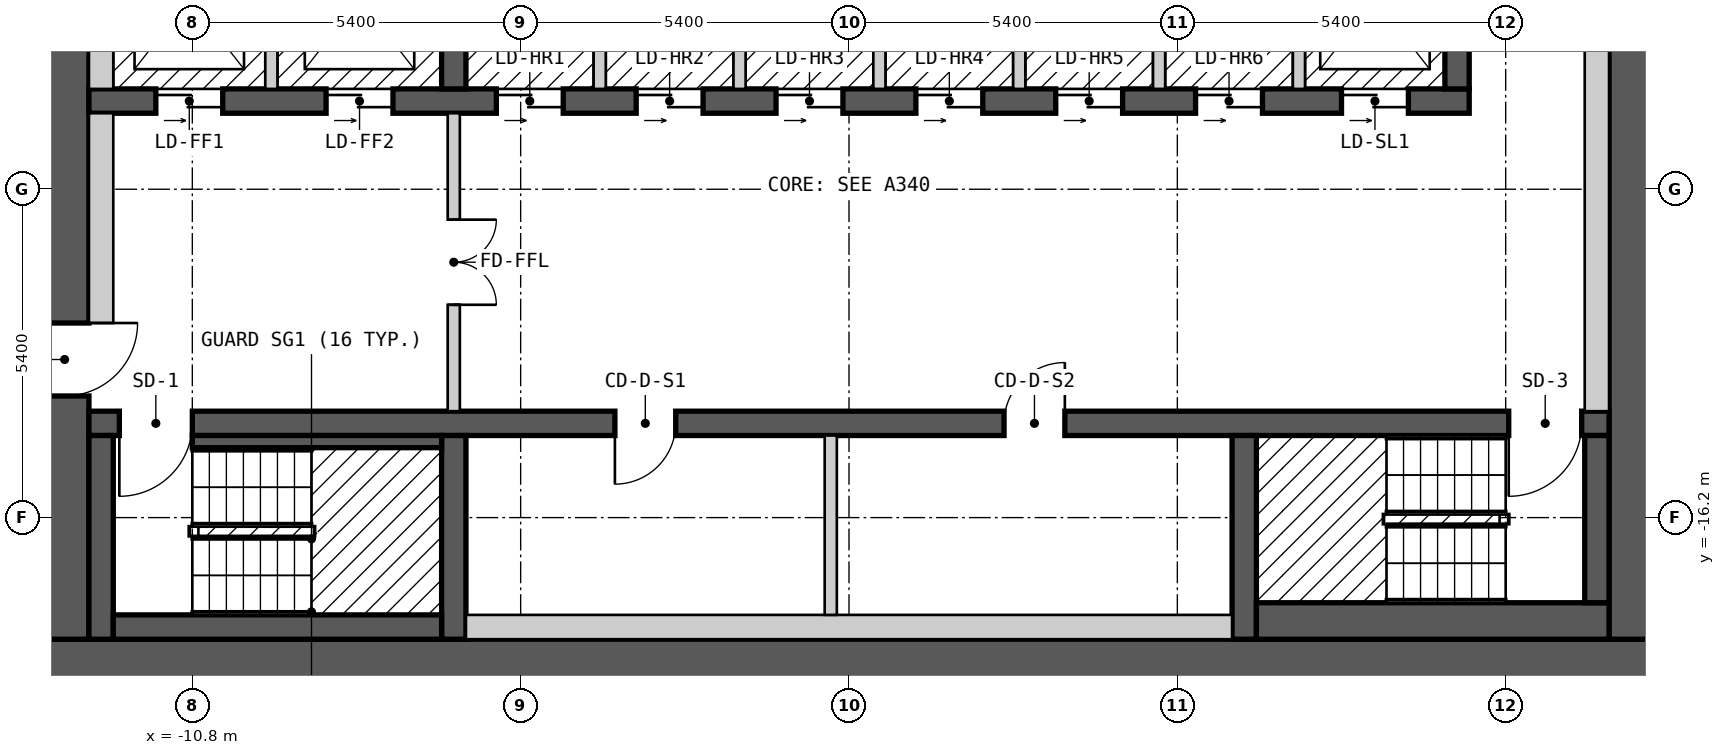
"""IFC4 building model, lengths in metres.
Left out: names, types, materials, properties, quantities, classifications, styles, units other than length and angle.
Written with IfcOpenShell. Run it as: python <this file> out.ifc"""

import sys

from ifc_helpers import new_model, si_unit, direction, frame, frame_2d, origin, place, context, subcontext, project, spatial, rectangle, extrude, element, fill, save


model = new_model("IFC4")
c1 = context("Model", 3, precision=1e-05, world=origin(), true_north=direction((0.0, 1.0)))
c2 = subcontext(c1, "Body", "Model", "MODEL_VIEW")
j1 = project(units=[si_unit("LENGTHUNIT", "METRE"), si_unit("PLANEANGLEUNIT", "RADIAN")], contexts=[c1])
p1 = place(None, origin())
s1 = spatial("IfcSite", under=j1, at=p1, CompositionType="ELEMENT")
p2 = place(p1, origin())
s2 = spatial("IfcBuilding", under=s1, at=p2, CompositionType="ELEMENT")
p3 = place(p2, frame((0.0, 0.0, 147.6)))
s3 = spatial("IfcBuildingStorey", under=s2, at=p3, CompositionType="ELEMENT", Elevation=147.6)
p4 = place(p3, frame((-13.3, -18.6, 0.0), z_axis=(0.0, 0.0, 1.0), x_axis=(1.0, 0.0, 0.0)))
e1 = element("IfcWall", 1, at=p4, inside=s3, PredefinedType="SHEAR", context=c2, shape_type="SweptSolid", body=[
    extrude(rectangle(XDim=26.6, YDim=0.8, at=frame_2d((13.3, 0.0))), origin(), (0.0, 0.0, 1.0), 2.7),
])
p5 = place(p3, frame((-12.9, -18.2, 0.0), z_axis=(0.0, 0.0, 1.0), x_axis=(0.0, 1.0, 0.0)))
e2 = element("IfcWall", 2, at=p5, inside=s3, PredefinedType="SHEAR", context=c2, shape_type="SweptSolid", body=[
    extrude(rectangle(XDim=12.4, YDim=0.8, at=frame_2d((6.2, 0.0))), origin(), (0.0, 0.0, 1.0), 2.7),
])
p6 = place(p5, frame((4.0, 0.0, 0.0)))
e3 = element("IfcOpeningElement", 3, at=p6, cuts=e2, PredefinedType="OPENING", context=c2, shape_type="SweptSolid", body=[
    extrude(rectangle(XDim=1.2, YDim=2.1, at=frame_2d((0.6, 1.05))), frame((0.0, 0.41, 0.0), z_axis=(0.0, -1.0, 0.0), x_axis=(1.0, 0.0, 0.0)), (0.0, 0.0, 1.0), 0.82),
])
p7 = place(p3, frame((12.9, -18.2, 0.0), z_axis=(0.0, 0.0, 1.0), x_axis=(0.0, 1.0, 0.0)))
e4 = element("IfcWall", 4, at=p7, inside=s3, PredefinedType="SHEAR", context=c2, shape_type="SweptSolid", body=[
    extrude(rectangle(XDim=12.4, YDim=0.8, at=frame_2d((6.2, 0.0))), origin(), (0.0, 0.0, 1.0), 2.7),
])
p8 = place(p3, frame((-12.5, -14.65, 0.0), z_axis=(0.0, 0.0, 1.0), x_axis=(1.0, 0.0, 0.0)))
e5 = element("IfcWall", 5, at=p8, inside=s3, PredefinedType="SHEAR", context=c2, shape_type="SweptSolid", body=[
    extrude(rectangle(XDim=25.0, YDim=0.4, at=frame_2d((12.5, 0.0))), origin(), (0.0, 0.0, 1.0), 2.7),
])
p9 = place(p8, frame((1.7, 0.0, 0.0), z_axis=(0.0, 0.0, 1.0), x_axis=(-1.0, 0.0, 0.0)))
e6 = element("IfcOpeningElement", 6, at=p9, cuts=e5, PredefinedType="OPENING", context=c2, shape_type="SweptSolid", body=[
    extrude(rectangle(XDim=1.2, YDim=2.1, at=frame_2d((0.6, 1.05))), frame((0.0, 0.21, 0.0), z_axis=(0.0, -1.0, 0.0), x_axis=(1.0, 0.0, 0.0)), (0.0, 0.0, 1.0), 0.42),
])
p10 = place(p8, frame((24.55, 0.0, 0.0), z_axis=(0.0, 0.0, 1.0), x_axis=(-1.0, 0.0, 0.0)))
e7 = element("IfcOpeningElement", 7, at=p10, cuts=e5, PredefinedType="OPENING", context=c2, shape_type="SweptSolid", body=[
    extrude(rectangle(XDim=1.2, YDim=2.1, at=frame_2d((0.6, 1.05))), frame((0.0, 0.21, 0.0), z_axis=(0.0, -1.0, 0.0), x_axis=(1.0, 0.0, 0.0)), (0.0, 0.0, 1.0), 0.42),
])
p11 = place(p8, frame((9.65, 0.0, 0.0), z_axis=(0.0, 0.0, 1.0), x_axis=(-1.0, 0.0, 0.0)))
e8 = element("IfcOpeningElement", 8, at=p11, cuts=e5, PredefinedType="OPENING", context=c2, shape_type="SweptSolid", body=[
    extrude(rectangle(XDim=1.0, YDim=2.1, at=frame_2d((0.5, 1.05))), frame((0.0, 0.21, 0.0), z_axis=(0.0, -1.0, 0.0), x_axis=(1.0, 0.0, 0.0)), (0.0, 0.0, 1.0), 0.42),
])
p12 = place(p8, frame((16.05, 0.0, 0.0), z_axis=(0.0, 0.0, 1.0), x_axis=(-1.0, 0.0, 0.0)))
e9 = element("IfcOpeningElement", 9, at=p12, cuts=e5, PredefinedType="OPENING", context=c2, shape_type="SweptSolid", body=[
    extrude(rectangle(XDim=1.0, YDim=2.1, at=frame_2d((0.5, 1.05))), frame((0.0, 0.21, 0.0), z_axis=(0.0, -1.0, 0.0), x_axis=(1.0, 0.0, 0.0)), (0.0, 0.0, 1.0), 0.42),
])
p13 = place(p3, frame((-12.5, -9.35, 0.0), z_axis=(0.0, 0.0, 1.0), x_axis=(1.0, 0.0, 0.0)))
e10 = element("IfcWall", 10, at=p13, inside=s3, PredefinedType="SHEAR", context=c2, shape_type="SweptSolid", body=[
    extrude(rectangle(XDim=22.7, YDim=0.4, at=frame_2d((11.35, 0.0))), origin(), (0.0, 0.0, 1.0), 2.7),
])
p14 = place(p13, frame((1.1, 0.0, 0.0)))
e11 = element("IfcOpeningElement", 11, at=p14, cuts=e10, PredefinedType="OPENING", context=c2, shape_type="SweptSolid", body=[
    extrude(rectangle(XDim=1.1, YDim=2.1, at=frame_2d((0.55, 1.05))), frame((0.0, 0.21, 0.0), z_axis=(0.0, -1.0, 0.0), x_axis=(1.0, 0.0, 0.0)), (0.0, 0.0, 1.0), 0.42),
])
p15 = place(p13, frame((3.9, 0.0, 0.0)))
e12 = element("IfcOpeningElement", 12, at=p15, cuts=e10, PredefinedType="OPENING", context=c2, shape_type="SweptSolid", body=[
    extrude(rectangle(XDim=1.1, YDim=2.1, at=frame_2d((0.55, 1.05))), frame((0.0, 0.21, 0.0), z_axis=(0.0, -1.0, 0.0), x_axis=(1.0, 0.0, 0.0)), (0.0, 0.0, 1.0), 0.42),
])
p16 = place(p13, frame((6.7, 0.0, 0.0)))
e13 = element("IfcOpeningElement", 13, at=p16, cuts=e10, PredefinedType="OPENING", context=c2, shape_type="SweptSolid", body=[
    extrude(rectangle(XDim=1.1, YDim=2.1, at=frame_2d((0.55, 1.05))), frame((0.0, 0.21, 0.0), z_axis=(0.0, -1.0, 0.0), x_axis=(1.0, 0.0, 0.0)), (0.0, 0.0, 1.0), 0.42),
])
p17 = place(p13, frame((9.0, 0.0, 0.0)))
e14 = element("IfcOpeningElement", 14, at=p17, cuts=e10, PredefinedType="OPENING", context=c2, shape_type="SweptSolid", body=[
    extrude(rectangle(XDim=1.1, YDim=2.1, at=frame_2d((0.55, 1.05))), frame((0.0, 0.21, 0.0), z_axis=(0.0, -1.0, 0.0), x_axis=(1.0, 0.0, 0.0)), (0.0, 0.0, 1.0), 0.42),
])
p18 = place(p13, frame((11.3, 0.0, 0.0)))
e15 = element("IfcOpeningElement", 15, at=p18, cuts=e10, PredefinedType="OPENING", context=c2, shape_type="SweptSolid", body=[
    extrude(rectangle(XDim=1.1, YDim=2.1, at=frame_2d((0.55, 1.05))), frame((0.0, 0.21, 0.0), z_axis=(0.0, -1.0, 0.0), x_axis=(1.0, 0.0, 0.0)), (0.0, 0.0, 1.0), 0.42),
])
p19 = place(p13, frame((13.6, 0.0, 0.0)))
e16 = element("IfcOpeningElement", 16, at=p19, cuts=e10, PredefinedType="OPENING", context=c2, shape_type="SweptSolid", body=[
    extrude(rectangle(XDim=1.1, YDim=2.1, at=frame_2d((0.55, 1.05))), frame((0.0, 0.21, 0.0), z_axis=(0.0, -1.0, 0.0), x_axis=(1.0, 0.0, 0.0)), (0.0, 0.0, 1.0), 0.42),
])
p20 = place(p13, frame((15.9, 0.0, 0.0)))
e17 = element("IfcOpeningElement", 17, at=p20, cuts=e10, PredefinedType="OPENING", context=c2, shape_type="SweptSolid", body=[
    extrude(rectangle(XDim=1.1, YDim=2.1, at=frame_2d((0.55, 1.05))), frame((0.0, 0.21, 0.0), z_axis=(0.0, -1.0, 0.0), x_axis=(1.0, 0.0, 0.0)), (0.0, 0.0, 1.0), 0.42),
])
p21 = place(p13, frame((18.2, 0.0, 0.0)))
e18 = element("IfcOpeningElement", 18, at=p21, cuts=e10, PredefinedType="OPENING", context=c2, shape_type="SweptSolid", body=[
    extrude(rectangle(XDim=1.1, YDim=2.1, at=frame_2d((0.55, 1.05))), frame((0.0, 0.21, 0.0), z_axis=(0.0, -1.0, 0.0), x_axis=(1.0, 0.0, 0.0)), (0.0, 0.0, 1.0), 0.42),
])
p22 = place(p13, frame((20.6, 0.0, 0.0)))
e19 = element("IfcOpeningElement", 19, at=p22, cuts=e10, PredefinedType="OPENING", context=c2, shape_type="SweptSolid", body=[
    extrude(rectangle(XDim=1.1, YDim=2.1, at=frame_2d((0.55, 1.05))), frame((0.0, 0.21, 0.0), z_axis=(0.0, -1.0, 0.0), x_axis=(1.0, 0.0, 0.0)), (0.0, 0.0, 1.0), 0.42),
])
for number, where, z_axis, x_axis in (
    (20, (-6.5, -18.2, 0.0), (0.0, 0.0, 1.0), (0.0, 1.0, 0.0)),
    (21, (6.5, -18.2, 0.0), (0.0, 0.0, 1.0), (0.0, 1.0, 0.0)),
    (22, (-6.5, -9.15, 0.0), (0.0, 0.0, 1.0), (0.0, 1.0, 0.0)),
    (23, (10.0, -9.15, 0.0), (0.0, 0.0, 1.0), (0.0, 1.0, 0.0)),
):
    element("IfcWall", number, at=place(p3, frame(where, z_axis=z_axis, x_axis=x_axis)), inside=s3, PredefinedType="SHEAR", context=c2, shape_type="SweptSolid", body=[
        extrude(rectangle(XDim=3.35, YDim=0.4, at=frame_2d((1.675, 0.0))), origin(), (0.0, 0.0, 1.0), 2.7),
    ])
p23 = place(p3, frame((-12.3, -18.2, 0.0), z_axis=(0.0, 0.0, 1.0), x_axis=(0.0, 1.0, 0.0)))
e24 = element("IfcWall", 24, at=p23, inside=s3, PredefinedType="SOLIDWALL", context=c2, shape_type="SweptSolid", body=[
    extrude(rectangle(XDim=3.35, YDim=0.4, at=frame_2d((1.675, 0.0))), origin(), (0.0, 0.0, 1.0), 2.7),
])
p24 = place(p3, frame((-12.3, -13.0, 0.0), z_axis=(0.0, 0.0, 1.0), x_axis=(0.0, 1.0, 0.0)))
e25 = element("IfcWall", 25, at=p24, inside=s3, PredefinedType="PARTITIONING", context=c2, shape_type="SweptSolid", body=[
    extrude(rectangle(XDim=3.45, YDim=0.4, at=frame_2d((1.725, 0.0))), origin(), (0.0, 0.0, 1.0), 2.7),
])
p25 = place(p3, frame((-12.3, -9.15, 0.0), z_axis=(0.0, 0.0, 1.0), x_axis=(0.0, 1.0, 0.0)))
e26 = element("IfcWall", 26, at=p25, inside=s3, PredefinedType="SOLIDWALL", context=c2, shape_type="SweptSolid", body=[
    extrude(rectangle(XDim=3.35, YDim=0.4, at=frame_2d((1.675, 0.0))), origin(), (0.0, 0.0, 1.0), 2.7),
])
p26 = place(p3, frame((-12.1, -18.0, 0.0), z_axis=(0.0, 0.0, 1.0), x_axis=(1.0, 0.0, 0.0)))
e27 = element("IfcWall", 27, at=p26, inside=s3, PredefinedType="SOLIDWALL", context=c2, shape_type="SweptSolid", body=[
    extrude(rectangle(XDim=5.4, YDim=0.4, at=frame_2d((2.7, 0.0))), origin(), (0.0, 0.0, 1.0), 2.7),
])
p27 = place(p3, frame((-10.8, -14.95, 0.0), z_axis=(0.0, 0.0, 1.0), x_axis=(1.0, 0.0, 0.0)))
e28 = element("IfcWall", 28, at=p27, inside=s3, PredefinedType="SOLIDWALL", context=c2, shape_type="SweptSolid", body=[
    extrude(rectangle(XDim=4.1, YDim=0.2, at=frame_2d((2.05, 0.0))), origin(), (0.0, 0.0, 1.0), 2.7),
])
p28 = place(p3, frame((-9.5, -9.15, 0.0), z_axis=(0.0, 0.0, 1.0), x_axis=(0.0, 1.0, 0.0)))
e29 = element("IfcWall", 29, at=p28, inside=s3, PredefinedType="SOLIDWALL", context=c2, shape_type="SweptSolid", body=[
    extrude(rectangle(XDim=2.95, YDim=0.2, at=frame_2d((1.475, 0.0))), origin(), (0.0, 0.0, 1.0), 2.7),
])
p29 = place(p3, frame((-6.5, -14.45, 0.0), z_axis=(0.0, 0.0, 1.0), x_axis=(0.0, 1.0, 0.0)))
e30 = element("IfcWall", 30, at=p29, inside=s3, PredefinedType="PARTITIONING", context=c2, shape_type="SweptSolid", body=[
    extrude(rectangle(XDim=4.9, YDim=0.2, at=frame_2d((2.45, 0.0))), origin(), (0.0, 0.0, 1.0), 2.7),
])
p30 = place(p29, frame((3.15, 0.0, 0.0), z_axis=(0.0, 0.0, 1.0), x_axis=(-1.0, 0.0, 0.0)))
e31 = element("IfcOpeningElement", 31, at=p30, cuts=e30, PredefinedType="OPENING", context=c2, shape_type="SweptSolid", body=[
    extrude(rectangle(XDim=1.4, YDim=2.1, at=frame_2d((0.7, 1.05))), frame((0.0, 0.11, 0.0), z_axis=(0.0, -1.0, 0.0), x_axis=(1.0, 0.0, 0.0)), (0.0, 0.0, 1.0), 0.22),
])
p31 = place(p3, frame((-6.3, -18.0, 0.0), z_axis=(0.0, 0.0, 1.0), x_axis=(1.0, 0.0, 0.0)))
e32 = element("IfcWall", 32, at=p31, inside=s3, PredefinedType="PARTITIONING", context=c2, shape_type="SweptSolid", body=[
    extrude(rectangle(XDim=12.6, YDim=0.4, at=frame_2d((6.3, 0.0))), origin(), (0.0, 0.0, 1.0), 2.7),
])
for number, where, z_axis, x_axis in (
    (33, (-4.1, -9.15, 0.0), (0.0, 0.0, 1.0), (0.0, 1.0, 0.0)),
    (34, (-1.8, -9.15, 0.0), (0.0, 0.0, 1.0), (0.0, 1.0, 0.0)),
):
    element("IfcWall", number, at=place(p3, frame(where, z_axis=z_axis, x_axis=x_axis)), inside=s3, PredefinedType="SOLIDWALL", context=c2, shape_type="SweptSolid", body=[
        extrude(rectangle(XDim=2.95, YDim=0.2, at=frame_2d((1.475, 0.0))), origin(), (0.0, 0.0, 1.0), 2.7),
    ])
p32 = place(p3, frame((-0.3, -17.8, 0.0), z_axis=(0.0, 0.0, 1.0), x_axis=(0.0, 1.0, 0.0)))
e35 = element("IfcWall", 35, at=p32, inside=s3, PredefinedType="PARTITIONING", context=c2, shape_type="SweptSolid", body=[
    extrude(rectangle(XDim=2.95, YDim=0.2, at=frame_2d((1.475, 0.0))), origin(), (0.0, 0.0, 1.0), 2.7),
])
for number, where, z_axis, x_axis in (
    (36, (0.5, -9.15, 0.0), (0.0, 0.0, 1.0), (0.0, 1.0, 0.0)),
    (37, (2.8, -9.15, 0.0), (0.0, 0.0, 1.0), (0.0, 1.0, 0.0)),
    (38, (5.1, -9.15, 0.0), (0.0, 0.0, 1.0), (0.0, 1.0, 0.0)),
):
    element("IfcWall", number, at=place(p3, frame(where, z_axis=z_axis, x_axis=x_axis)), inside=s3, PredefinedType="SOLIDWALL", context=c2, shape_type="SweptSolid", body=[
        extrude(rectangle(XDim=2.95, YDim=0.2, at=frame_2d((1.475, 0.0))), origin(), (0.0, 0.0, 1.0), 2.7),
    ])
p33 = place(p3, frame((6.7, -17.9, 0.0), z_axis=(0.0, 0.0, 1.0), x_axis=(1.0, 0.0, 0.0)))
e39 = element("IfcWall", 39, at=p33, inside=s3, PredefinedType="SOLIDWALL", context=c2, shape_type="SweptSolid", body=[
    extrude(rectangle(XDim=5.8, YDim=0.6, at=frame_2d((2.9, 0.0))), origin(), (0.0, 0.0, 1.0), 2.7),
])
p34 = place(p3, frame((7.4, -9.15, 0.0), z_axis=(0.0, 0.0, 1.0), x_axis=(0.0, 1.0, 0.0)))
e40 = element("IfcWall", 40, at=p34, inside=s3, PredefinedType="SOLIDWALL", context=c2, shape_type="SweptSolid", body=[
    extrude(rectangle(XDim=2.95, YDim=0.2, at=frame_2d((1.475, 0.0))), origin(), (0.0, 0.0, 1.0), 2.7),
])
p35 = place(p3, frame((12.3, -17.6, 0.0), z_axis=(0.0, 0.0, 1.0), x_axis=(0.0, 1.0, 0.0)))
e41 = element("IfcWall", 41, at=p35, inside=s3, PredefinedType="SOLIDWALL", context=c2, shape_type="SweptSolid", body=[
    extrude(rectangle(XDim=2.75, YDim=0.4, at=frame_2d((1.375, 0.0))), origin(), (0.0, 0.0, 1.0), 2.7),
])
p36 = place(p3, frame((12.3, -14.45, 0.0), z_axis=(0.0, 0.0, 1.0), x_axis=(0.0, 1.0, 0.0)))
e42 = element("IfcWall", 42, at=p36, inside=s3, PredefinedType="PARTITIONING", context=c2, shape_type="SweptSolid", body=[
    extrude(rectangle(XDim=8.25, YDim=0.4, at=frame_2d((4.125, 0.0))), origin(), (0.0, 0.0, 1.0), 2.7),
])
p37 = place(p14, origin())
e43 = element("IfcDoor", 43, at=p37, inside=s3, OperationType="DOUBLE_DOOR_SLIDING", PredefinedType="DOOR", context=c2, shape_type="SweptSolid", body=[
    extrude(rectangle(XDim=1.1, YDim=2.1, at=frame_2d((0.55, 1.05))), frame((0.0, 0.025, 0.0), z_axis=(0.0, -1.0, 0.0), x_axis=(1.0, 0.0, 0.0)), (0.0, 0.0, 1.0), 0.05),
])
fill(e11, e43)
p38 = place(p15, origin())
e44 = element("IfcDoor", 44, at=p38, inside=s3, OperationType="DOUBLE_DOOR_SLIDING", PredefinedType="DOOR", context=c2, shape_type="SweptSolid", body=[
    extrude(rectangle(XDim=1.1, YDim=2.1, at=frame_2d((0.55, 1.05))), frame((0.0, 0.025, 0.0), z_axis=(0.0, -1.0, 0.0), x_axis=(1.0, 0.0, 0.0)), (0.0, 0.0, 1.0), 0.05),
])
fill(e12, e44)
p39 = place(p16, origin())
e45 = element("IfcDoor", 45, at=p39, inside=s3, OperationType="DOUBLE_DOOR_SLIDING", PredefinedType="DOOR", context=c2, shape_type="SweptSolid", body=[
    extrude(rectangle(XDim=1.1, YDim=2.1, at=frame_2d((0.55, 1.05))), frame((0.0, 0.025, 0.0), z_axis=(0.0, -1.0, 0.0), x_axis=(1.0, 0.0, 0.0)), (0.0, 0.0, 1.0), 0.05),
])
fill(e13, e45)
p40 = place(p17, origin())
e46 = element("IfcDoor", 46, at=p40, inside=s3, OperationType="DOUBLE_DOOR_SLIDING", PredefinedType="DOOR", context=c2, shape_type="SweptSolid", body=[
    extrude(rectangle(XDim=1.1, YDim=2.1, at=frame_2d((0.55, 1.05))), frame((0.0, 0.025, 0.0), z_axis=(0.0, -1.0, 0.0), x_axis=(1.0, 0.0, 0.0)), (0.0, 0.0, 1.0), 0.05),
])
fill(e14, e46)
p41 = place(p18, origin())
e47 = element("IfcDoor", 47, at=p41, inside=s3, OperationType="DOUBLE_DOOR_SLIDING", PredefinedType="DOOR", context=c2, shape_type="SweptSolid", body=[
    extrude(rectangle(XDim=1.1, YDim=2.1, at=frame_2d((0.55, 1.05))), frame((0.0, 0.025, 0.0), z_axis=(0.0, -1.0, 0.0), x_axis=(1.0, 0.0, 0.0)), (0.0, 0.0, 1.0), 0.05),
])
fill(e15, e47)
p42 = place(p19, origin())
e48 = element("IfcDoor", 48, at=p42, inside=s3, OperationType="DOUBLE_DOOR_SLIDING", PredefinedType="DOOR", context=c2, shape_type="SweptSolid", body=[
    extrude(rectangle(XDim=1.1, YDim=2.1, at=frame_2d((0.55, 1.05))), frame((0.0, 0.025, 0.0), z_axis=(0.0, -1.0, 0.0), x_axis=(1.0, 0.0, 0.0)), (0.0, 0.0, 1.0), 0.05),
])
fill(e16, e48)
p43 = place(p20, origin())
e49 = element("IfcDoor", 49, at=p43, inside=s3, OperationType="DOUBLE_DOOR_SLIDING", PredefinedType="DOOR", context=c2, shape_type="SweptSolid", body=[
    extrude(rectangle(XDim=1.1, YDim=2.1, at=frame_2d((0.55, 1.05))), frame((0.0, 0.025, 0.0), z_axis=(0.0, -1.0, 0.0), x_axis=(1.0, 0.0, 0.0)), (0.0, 0.0, 1.0), 0.05),
])
fill(e17, e49)
p44 = place(p21, origin())
e50 = element("IfcDoor", 50, at=p44, inside=s3, OperationType="DOUBLE_DOOR_SLIDING", PredefinedType="DOOR", context=c2, shape_type="SweptSolid", body=[
    extrude(rectangle(XDim=1.1, YDim=2.1, at=frame_2d((0.55, 1.05))), frame((0.0, 0.025, 0.0), z_axis=(0.0, -1.0, 0.0), x_axis=(1.0, 0.0, 0.0)), (0.0, 0.0, 1.0), 0.05),
])
fill(e18, e50)
p45 = place(p22, origin())
e51 = element("IfcDoor", 51, at=p45, inside=s3, OperationType="DOUBLE_DOOR_SLIDING", PredefinedType="DOOR", context=c2, shape_type="SweptSolid", body=[
    extrude(rectangle(XDim=1.1, YDim=2.1, at=frame_2d((0.55, 1.05))), frame((0.0, 0.025, 0.0), z_axis=(0.0, -1.0, 0.0), x_axis=(1.0, 0.0, 0.0)), (0.0, 0.0, 1.0), 0.05),
])
fill(e19, e51)
p46 = place(p9, origin())
e52 = element("IfcDoor", 52, at=p46, inside=s3, OperationType="SINGLE_SWING_RIGHT", PredefinedType="DOOR", context=c2, shape_type="SweptSolid", body=[
    extrude(rectangle(XDim=1.2, YDim=2.1, at=frame_2d((0.6, 1.05))), frame((0.0, 0.025, 0.0), z_axis=(0.0, -1.0, 0.0), x_axis=(1.0, 0.0, 0.0)), (0.0, 0.0, 1.0), 0.05),
])
fill(e6, e52)
p47 = place(p10, origin())
e53 = element("IfcDoor", 53, at=p47, inside=s3, OperationType="SINGLE_SWING_RIGHT", PredefinedType="DOOR", context=c2, shape_type="SweptSolid", body=[
    extrude(rectangle(XDim=1.2, YDim=2.1, at=frame_2d((0.6, 1.05))), frame((0.0, 0.025, 0.0), z_axis=(0.0, -1.0, 0.0), x_axis=(1.0, 0.0, 0.0)), (0.0, 0.0, 1.0), 0.05),
])
fill(e7, e53)
p48 = place(p6, origin())
e54 = element("IfcDoor", 54, at=p48, inside=s3, OperationType="SINGLE_SWING_RIGHT", PredefinedType="DOOR", context=c2, shape_type="SweptSolid", body=[
    extrude(rectangle(XDim=1.2, YDim=2.1, at=frame_2d((0.6, 1.05))), frame((0.0, 0.025, 0.0), z_axis=(0.0, -1.0, 0.0), x_axis=(1.0, 0.0, 0.0)), (0.0, 0.0, 1.0), 0.05),
])
fill(e3, e54)
p49 = place(p30, origin())
e55 = element("IfcDoor", 55, at=p49, inside=s3, OperationType="DOUBLE_DOOR_SINGLE_SWING", PredefinedType="DOOR", context=c2, shape_type="SweptSolid", body=[
    extrude(rectangle(XDim=1.4, YDim=2.1, at=frame_2d((0.7, 1.05))), frame((0.0, 0.025, 0.0), z_axis=(0.0, -1.0, 0.0), x_axis=(1.0, 0.0, 0.0)), (0.0, 0.0, 1.0), 0.05),
])
fill(e31, e55)
p50 = place(p11, origin())
e56 = element("IfcDoor", 56, at=p50, inside=s3, OperationType="SINGLE_SWING_RIGHT", PredefinedType="DOOR", context=c2, shape_type="SweptSolid", body=[
    extrude(rectangle(XDim=1.0, YDim=2.1, at=frame_2d((0.5, 1.05))), frame((0.0, 0.025, 0.0), z_axis=(0.0, -1.0, 0.0), x_axis=(1.0, 0.0, 0.0)), (0.0, 0.0, 1.0), 0.05),
])
fill(e8, e56)
p51 = place(p12, origin())
e57 = element("IfcDoor", 57, at=p51, inside=s3, OperationType="SINGLE_SWING_LEFT", PredefinedType="DOOR", context=c2, shape_type="SweptSolid", body=[
    extrude(rectangle(XDim=1.0, YDim=2.1, at=frame_2d((0.5, 1.05))), frame((0.0, 0.025, 0.0), z_axis=(0.0, -1.0, 0.0), x_axis=(1.0, 0.0, 0.0)), (0.0, 0.0, 1.0), 0.05),
])
fill(e9, e57)
save(model, sys.argv[1])
